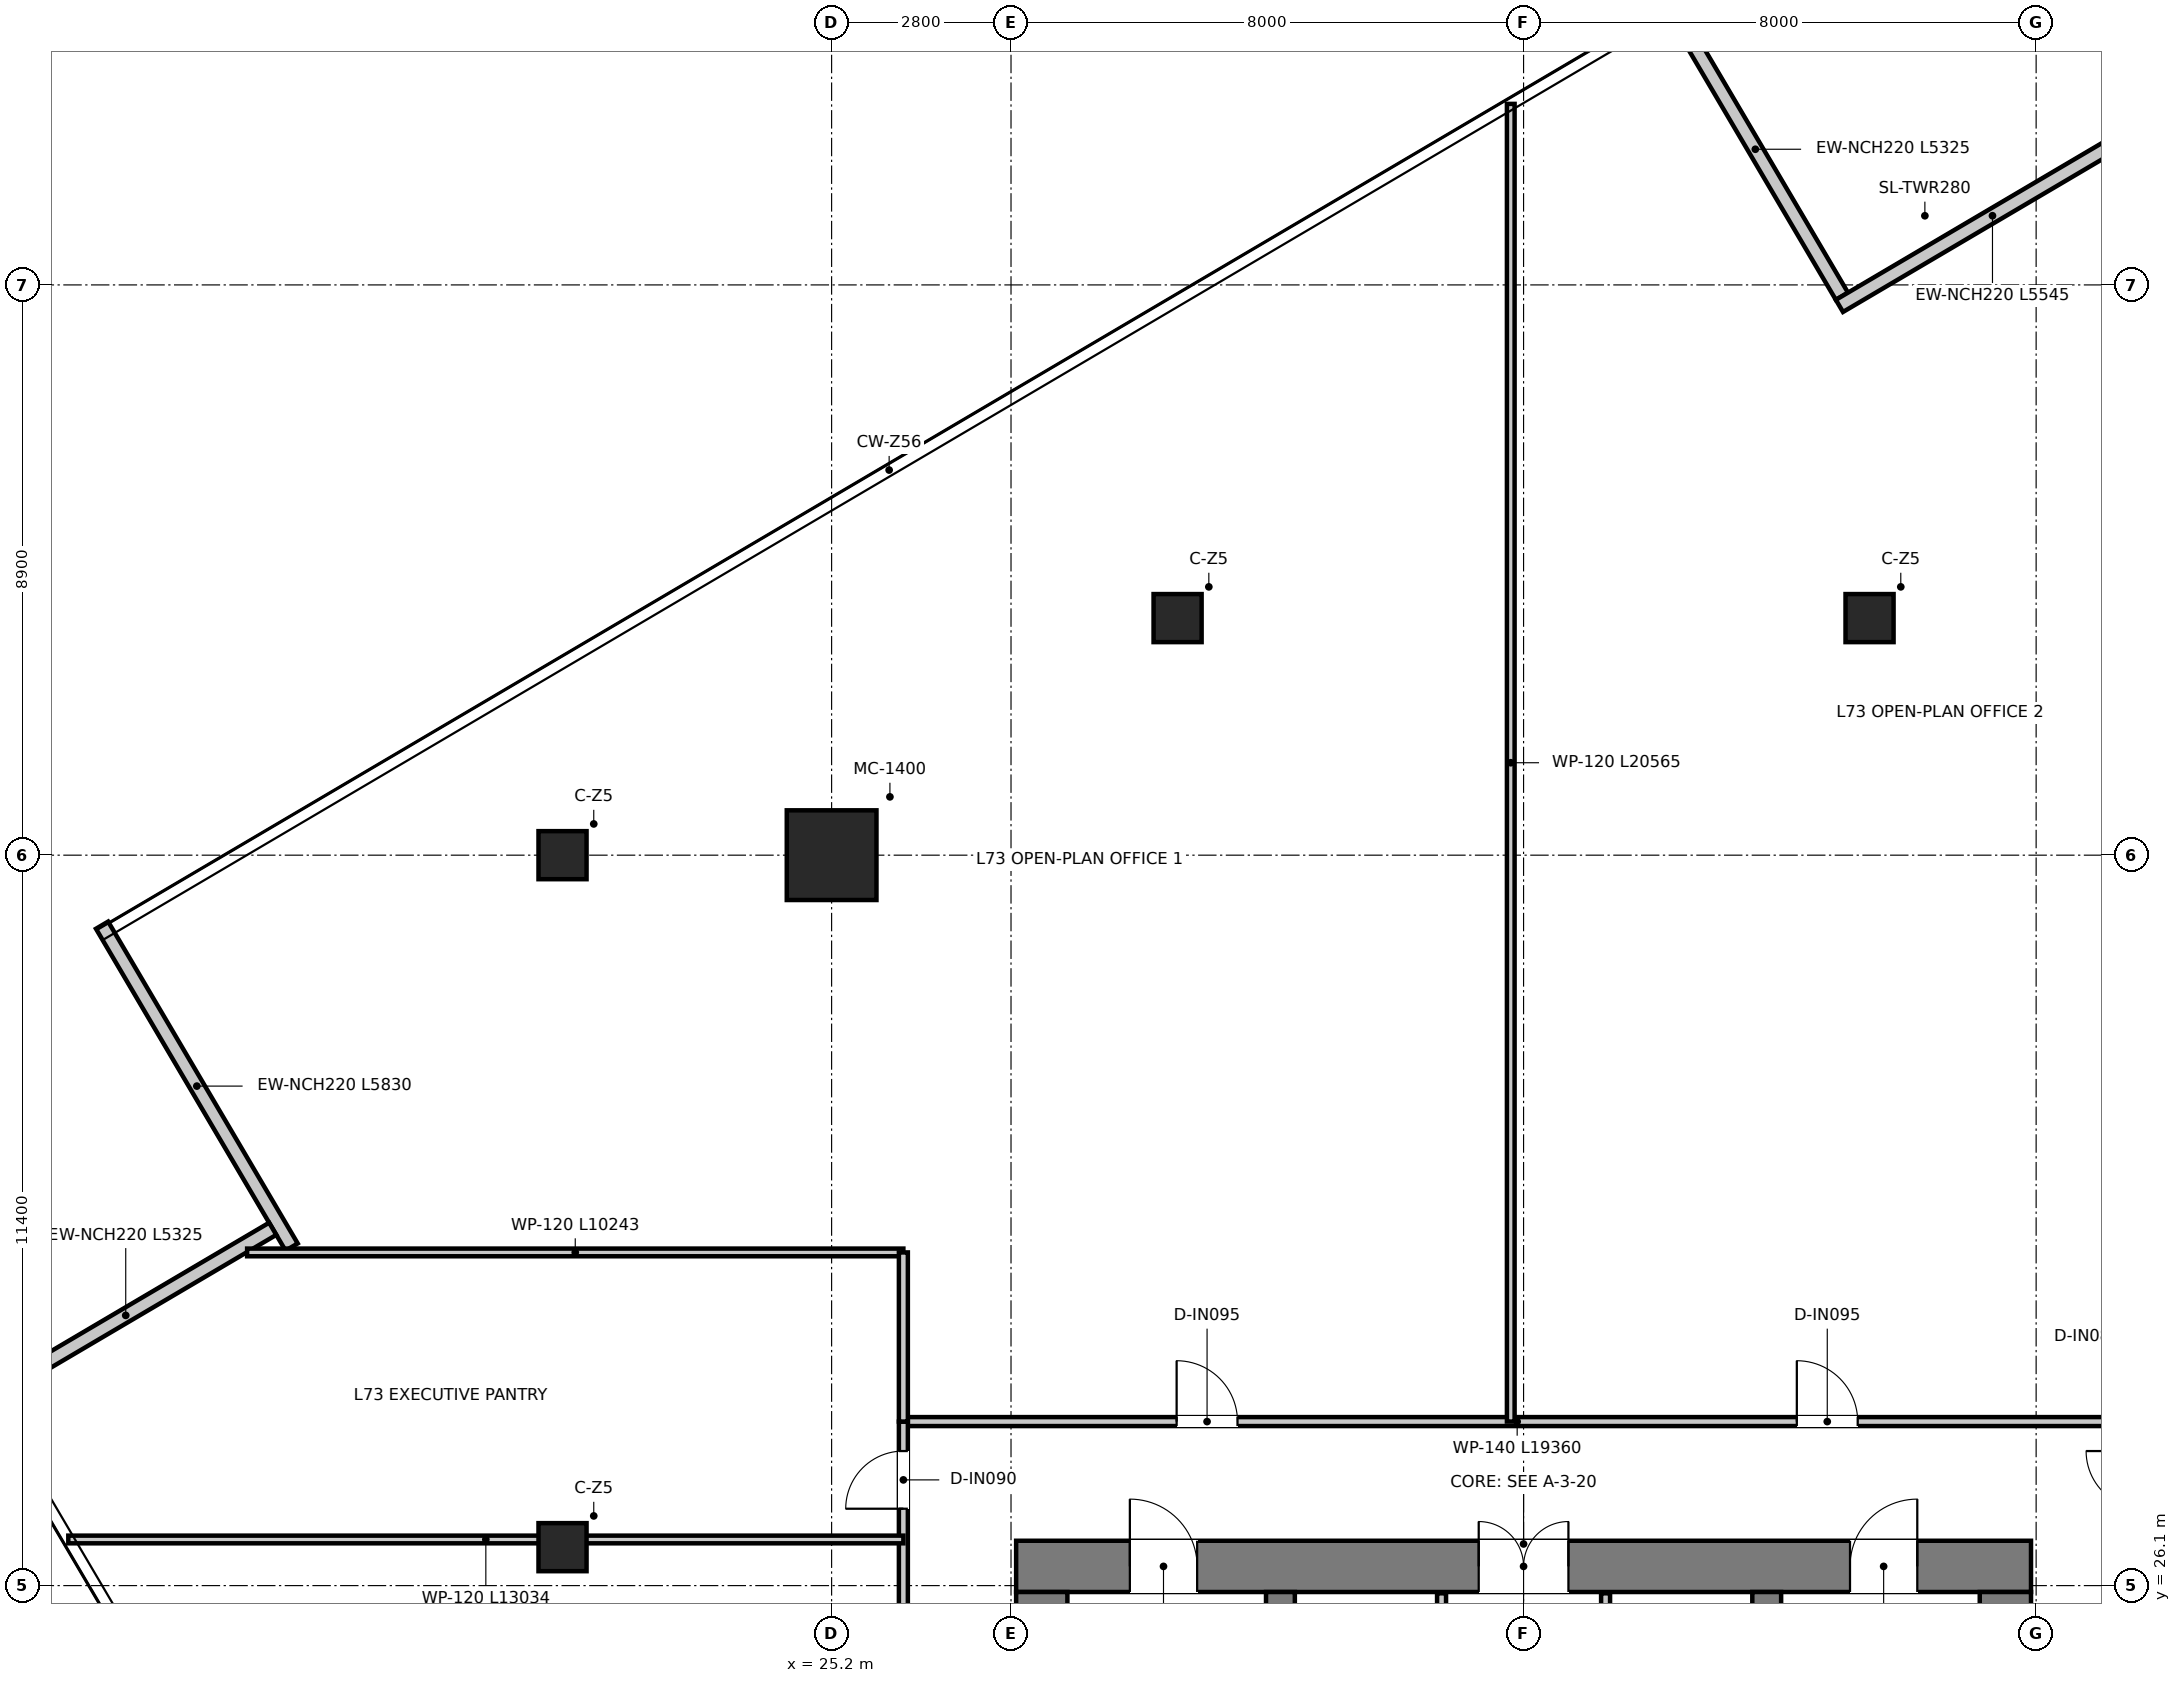
"""IFC4 building model, lengths in metres.
Left out: names, types, materials, properties, quantities, classifications, styles, units other than length and angle.
Written with IfcOpenShell. Run it as: python <this file> out.ifc"""

import sys

from ifc_helpers import new_model, si_unit, direction, frame, frame_2d, origin, origin_2d, place, context, subcontext, project, spatial, rectangle, extrude, source, transform, mapped, element, fill, save


model = new_model("IFC4")
c1 = context("Model", 3, precision=1e-05, world=origin(), true_north=direction((0.0, 1.0)))
c2 = subcontext(c1, "Body", "Model", "MODEL_VIEW")
j1 = project(units=[si_unit("LENGTHUNIT", "METRE"), si_unit("PLANEANGLEUNIT", "RADIAN")], contexts=[c1])
p1 = place(None, origin())
s1 = spatial("IfcSite", under=j1, at=p1, CompositionType="ELEMENT")
p2 = place(p1, origin())
s2 = spatial("IfcBuilding", under=s1, at=p2, CompositionType="ELEMENT")
p3 = place(p2, frame((0.0, 0.0, 299.0)))
s3 = spatial("IfcBuildingStorey", under=s2, at=p3, CompositionType="ELEMENT", Elevation=299.0)
p4 = place(p3, frame((28.08, 26.4, 0.0), z_axis=(0.0, 0.0, 1.0), x_axis=(1.0, 0.0, 0.0)))
e1 = element("IfcWall", 1, at=p4, inside=s3, PredefinedType="SHEAR", context=c2, shape_type="SweptSolid", body=[
    extrude(rectangle(XDim=15.84, YDim=0.8, at=frame_2d((7.92, 0.0))), origin(), (0.0, 0.0, 1.0), 3.95),
])
p5 = place(p4, frame((7.22, 0.0, 0.0)))
e2 = element("IfcOpeningElement", 2, at=p5, cuts=e1, PredefinedType="OPENING", context=c2, shape_type="SweptSolid", body=[
    extrude(rectangle(XDim=1.4, YDim=2.2, at=frame_2d((0.7, 1.1))), frame((0.0, 0.41, 0.0), z_axis=(0.0, -1.0, 0.0), x_axis=(1.0, 0.0, 0.0)), (0.0, 0.0, 1.0), 0.82),
])
p6 = place(p4, frame((1.775, 0.0, 0.0)))
e3 = element("IfcOpeningElement", 3, at=p6, cuts=e1, PredefinedType="OPENING", context=c2, shape_type="SweptSolid", body=[
    extrude(rectangle(XDim=1.05, YDim=2.1, at=frame_2d((0.525, 1.05))), frame((0.0, 0.41, 0.0), z_axis=(0.0, -1.0, 0.0), x_axis=(1.0, 0.0, 0.0)), (0.0, 0.0, 1.0), 0.82),
])
p7 = place(p4, frame((13.015, 0.0, 0.0)))
e4 = element("IfcOpeningElement", 4, at=p7, cuts=e1, PredefinedType="OPENING", context=c2, shape_type="SweptSolid", body=[
    extrude(rectangle(XDim=1.05, YDim=2.1, at=frame_2d((0.525, 1.05))), frame((0.0, 0.41, 0.0), z_axis=(0.0, -1.0, 0.0), x_axis=(1.0, 0.0, 0.0)), (0.0, 0.0, 1.0), 0.82),
])
for number, where, z_axis, x_axis in (
    (5, (28.48, 11.3, 0.0), (0.0, 0.0, 1.0), (0.0, 1.0, 0.0)),
    (6, (43.52, 11.3, 0.0), (0.0, 0.0, 1.0), (0.0, 1.0, 0.0)),
):
    element("IfcWall", number, at=place(p3, frame(where, z_axis=z_axis, x_axis=x_axis)), inside=s3, PredefinedType="SHEAR", context=c2, shape_type="SweptSolid", body=[
        extrude(rectangle(XDim=14.7, YDim=0.8, at=frame_2d((7.35, 0.0))), origin(), (0.0, 0.0, 1.0), 3.95),
    ])
p8 = place(p3, frame((32.205, 13.22, 0.0), z_axis=(0.0, 0.0, 1.0), x_axis=(0.0, 1.0, 0.0)))
e7 = element("IfcWall", 7, at=p8, inside=s3, PredefinedType="SHEAR", context=c2, shape_type="SweptSolid", body=[
    extrude(rectangle(XDim=12.78, YDim=0.45, at=frame_2d((6.39, 0.0))), origin(), (0.0, 0.0, 1.0), 3.95),
])
p9 = place(p8, frame((10.58, 0.0, 0.0)))
e8 = element("IfcOpeningElement", 8, at=p9, cuts=e7, PredefinedType="OPENING", context=c2, shape_type="SweptSolid", body=[
    extrude(rectangle(XDim=1.1, YDim=2.15, at=frame_2d((0.55, 1.075))), frame((0.0, 0.235, 0.0), z_axis=(0.0, -1.0, 0.0), x_axis=(1.0, 0.0, 0.0)), (0.0, 0.0, 1.0), 0.47),
])
p10 = place(p3, frame((39.795, 13.22, 0.0), z_axis=(0.0, 0.0, 1.0), x_axis=(0.0, 1.0, 0.0)))
e9 = element("IfcWall", 9, at=p10, inside=s3, PredefinedType="SHEAR", context=c2, shape_type="SweptSolid", body=[
    extrude(rectangle(XDim=12.78, YDim=0.45, at=frame_2d((6.39, 0.0))), origin(), (0.0, 0.0, 1.0), 3.95),
])
p11 = place(p10, frame((10.58, 0.0, 0.0)))
e10 = element("IfcOpeningElement", 10, at=p11, cuts=e9, PredefinedType="OPENING", context=c2, shape_type="SweptSolid", body=[
    extrude(rectangle(XDim=1.1, YDim=2.15, at=frame_2d((0.55, 1.075))), frame((0.0, 0.235, 0.0), z_axis=(0.0, -1.0, 0.0), x_axis=(1.0, 0.0, 0.0)), (0.0, 0.0, 1.0), 0.47),
])
m1 = source(origin(), c2, "Body", "SweptSolid", [
    extrude(rectangle(XDim=1.4, YDim=1.4, at=origin_2d()), origin(), (0.0, 0.0, 1.0), 3.95),
])
p12 = place(p3, frame((25.2, 37.5, 0.0), z_axis=(0.0, 0.0, 1.0), x_axis=(1.0, 0.0, 0.0)))
e11 = element("IfcColumn", 11, at=p12, inside=s3, PredefinedType="USERDEFINED", context=c2, shape_type="MappedRepresentation", body=[
    mapped(m1, transform((0.0, 0.0, 0.0), x_axis=(1.0, 0.0, 0.0), y_axis=(0.0, 1.0, 0.0), z_axis=(0.0, 0.0, 1.0), scale=1.0)),
])
m2 = source(origin(), c2, "Body", "SweptSolid", [
    extrude(rectangle(XDim=0.75, YDim=0.75, at=origin_2d()), origin(), (0.0, 0.0, 1.0), 3.95),
])
for number, where, z_axis, x_axis in (
    (12, (21.0, 26.7, 0.0), (0.0, 0.0, 1.0), (1.0, 0.0, 0.0)),
    (13, (21.0, 37.5, 0.0), (0.0, 0.0, 1.0), (1.0, 0.0, 0.0)),
    (14, (30.6, 41.2, 0.0), (0.0, 0.0, 1.0), (1.0, 0.0, 0.0)),
    (15, (41.4, 41.2, 0.0), (0.0, 0.0, 1.0), (1.0, 0.0, 0.0)),
):
    element("IfcColumn", number, at=place(p3, frame(where, z_axis=z_axis, x_axis=x_axis)), inside=s3, PredefinedType="COLUMN", context=c2, shape_type="MappedRepresentation", body=[
        mapped(m2, transform((0.0, 0.0, 0.0), x_axis=(1.0, 0.0, 0.0), y_axis=(0.0, 1.0, 0.0), z_axis=(0.0, 0.0, 1.0), scale=1.0)),
    ])
p13 = place(p3, frame((40.969, 46.223, 0.0), z_axis=(0.0, 0.0, 1.0), x_axis=(-0.507540984104, 0.861627616465, 0.0)))
e16 = element("IfcWall", 16, at=p13, inside=s3, PredefinedType="ELEMENTEDWALL", context=c2, shape_type="SweptSolid", body=[
    extrude(rectangle(XDim=5.325, YDim=0.22, at=frame_2d((2.663, 0.0))), origin(), (0.0, 0.0, 1.0), 3.67),
])
p14 = place(p3, frame((13.813, 36.407, 0.0), z_axis=(0.0, 0.0, 1.0), x_axis=(0.507550761113, -0.861621857252, 0.0)))
e17 = element("IfcWall", 17, at=p14, inside=s3, PredefinedType="ELEMENTEDWALL", context=c2, shape_type="SweptSolid", body=[
    extrude(rectangle(XDim=5.83, YDim=0.22, at=frame_2d((2.915, 0.0))), origin(), (0.0, 0.0, 1.0), 3.67),
])
p15 = place(p3, frame((16.477, 31.669, 0.0), z_axis=(0.0, 0.0, 1.0), x_axis=(-0.861627616465, -0.507540984104, 0.0)))
e18 = element("IfcWall", 18, at=p15, inside=s3, PredefinedType="ELEMENTEDWALL", context=c2, shape_type="SweptSolid", body=[
    extrude(rectangle(XDim=5.325, YDim=0.22, at=frame_2d((2.663, 0.0))), origin(), (0.0, 0.0, 1.0), 3.67),
])
p16 = place(p3, frame((45.708, 48.887, 0.0), z_axis=(0.0, 0.0, 1.0), x_axis=(-0.861640923955, -0.507518391948, 0.0)))
e19 = element("IfcWall", 19, at=p16, inside=s3, PredefinedType="ELEMENTEDWALL", context=c2, shape_type="SweptSolid", body=[
    extrude(rectangle(XDim=5.545, YDim=0.22, at=frame_2d((2.772, 0.0))), origin(), (0.0, 0.0, 1.0), 3.67),
])
p17 = place(p3, frame((34.72, 20.2, 0.0), z_axis=(0.0, 0.0, 1.0), x_axis=(0.0, 1.0, 0.0)))
e20 = element("IfcWall", 20, at=p17, inside=s3, PredefinedType="PARTITIONING", context=c2, shape_type="SweptSolid", body=[
    extrude(rectangle(XDim=5.78, YDim=0.14, at=frame_2d((2.89, 0.0))), origin(), (0.0, 0.0, 1.0), 2.82),
])
p18 = place(p17, frame((1.05, 0.0, 0.0)))
e21 = element("IfcOpeningElement", 21, at=p18, cuts=e20, PredefinedType="OPENING", context=c2, shape_type="SweptSolid", body=[
    extrude(rectangle(XDim=0.9, YDim=2.1, at=frame_2d((0.45, 1.05))), frame((0.0, 0.08, 0.0), z_axis=(0.0, -1.0, 0.0), x_axis=(1.0, 0.0, 0.0)), (0.0, 0.0, 1.0), 0.16),
])
p19 = place(p3, frame((37.28, 20.2, 0.0), z_axis=(0.0, 0.0, 1.0), x_axis=(0.0, 1.0, 0.0)))
e22 = element("IfcWall", 22, at=p19, inside=s3, PredefinedType="PARTITIONING", context=c2, shape_type="SweptSolid", body=[
    extrude(rectangle(XDim=5.78, YDim=0.14, at=frame_2d((2.89, 0.0))), origin(), (0.0, 0.0, 1.0), 2.82),
])
p20 = place(p19, frame((0.95, 0.0, 0.0)))
e23 = element("IfcOpeningElement", 23, at=p20, cuts=e22, PredefinedType="OPENING", context=c2, shape_type="SweptSolid", body=[
    extrude(rectangle(XDim=1.1, YDim=2.15, at=frame_2d((0.55, 1.075))), frame((0.0, 0.08, 0.0), z_axis=(0.0, -1.0, 0.0), x_axis=(1.0, 0.0, 0.0)), (0.0, 0.0, 1.0), 0.16),
])
p21 = place(p3, frame((26.32, 28.66, 0.0), z_axis=(0.0, 0.0, 1.0), x_axis=(1.0, 0.0, 0.0)))
e24 = element("IfcWall", 24, at=p21, inside=s3, PredefinedType="PARTITIONING", context=c2, shape_type="SweptSolid", body=[
    extrude(rectangle(XDim=19.36, YDim=0.14, at=frame_2d((9.68, 0.0))), origin(), (0.0, 0.0, 1.0), 3.18),
])
p22 = place(p21, frame((4.265, 0.0, 0.0)))
e25 = element("IfcOpeningElement", 25, at=p22, cuts=e24, PredefinedType="OPENING", context=c2, shape_type="SweptSolid", body=[
    extrude(rectangle(XDim=0.95, YDim=2.1, at=frame_2d((0.475, 1.05))), frame((0.0, 0.08, 0.0), z_axis=(0.0, -1.0, 0.0), x_axis=(1.0, 0.0, 0.0)), (0.0, 0.0, 1.0), 0.16),
])
p23 = place(p21, frame((13.945, 0.0, 0.0)))
e26 = element("IfcOpeningElement", 26, at=p23, cuts=e24, PredefinedType="OPENING", context=c2, shape_type="SweptSolid", body=[
    extrude(rectangle(XDim=0.95, YDim=2.1, at=frame_2d((0.475, 1.05))), frame((0.0, 0.08, 0.0), z_axis=(0.0, -1.0, 0.0), x_axis=(1.0, 0.0, 0.0)), (0.0, 0.0, 1.0), 0.16),
])
p24 = place(p3, frame((26.32, 9.0, 0.0), z_axis=(0.0, 0.0, 1.0), x_axis=(0.0, 1.0, 0.0)))
e27 = element("IfcWall", 27, at=p24, inside=s3, PredefinedType="PARTITIONING", context=c2, shape_type="SweptSolid", body=[
    extrude(rectangle(XDim=19.66, YDim=0.14, at=frame_2d((9.83, 0.0))), origin(), (0.0, 0.0, 1.0), 3.13),
])
p25 = place(p24, frame((18.3, 0.0, 0.0)))
e28 = element("IfcOpeningElement", 28, at=p25, cuts=e27, PredefinedType="OPENING", context=c2, shape_type="SweptSolid", body=[
    extrude(rectangle(XDim=0.9, YDim=2.1, at=frame_2d((0.45, 1.05))), frame((0.0, 0.08, 0.0), z_axis=(0.0, -1.0, 0.0), x_axis=(1.0, 0.0, 0.0)), (0.0, 0.0, 1.0), 0.16),
])
p26 = place(p24, frame((1.65, 0.0, 0.0)))
e29 = element("IfcOpeningElement", 29, at=p26, cuts=e27, PredefinedType="OPENING", context=c2, shape_type="SweptSolid", body=[
    extrude(rectangle(XDim=0.9, YDim=2.1, at=frame_2d((0.45, 1.05))), frame((0.0, 0.08, 0.0), z_axis=(0.0, -1.0, 0.0), x_axis=(1.0, 0.0, 0.0)), (0.0, 0.0, 1.0), 0.16),
])
p27 = place(p24, frame((8.7, 0.0, 0.0)))
e30 = element("IfcOpeningElement", 30, at=p27, cuts=e27, PredefinedType="OPENING", context=c2, shape_type="SweptSolid", body=[
    extrude(rectangle(XDim=0.9, YDim=2.1, at=frame_2d((0.45, 1.05))), frame((0.0, 0.08, 0.0), z_axis=(0.0, -1.0, 0.0), x_axis=(1.0, 0.0, 0.0)), (0.0, 0.0, 1.0), 0.16),
])
p28 = place(p24, frame((11.85, 0.0, 0.0)))
e31 = element("IfcOpeningElement", 31, at=p28, cuts=e27, PredefinedType="OPENING", context=c2, shape_type="SweptSolid", body=[
    extrude(rectangle(XDim=0.9, YDim=2.1, at=frame_2d((0.45, 1.05))), frame((0.0, 0.08, 0.0), z_axis=(0.0, -1.0, 0.0), x_axis=(1.0, 0.0, 0.0)), (0.0, 0.0, 1.0), 0.16),
])
p29 = place(p24, frame((15.86, 0.0, 0.0)))
e32 = element("IfcOpeningElement", 32, at=p29, cuts=e27, PredefinedType="OPENING", context=c2, shape_type="SweptSolid", body=[
    extrude(rectangle(XDim=0.9, YDim=2.1, at=frame_2d((0.45, 1.05))), frame((0.0, 0.08, 0.0), z_axis=(0.0, -1.0, 0.0), x_axis=(1.0, 0.0, 0.0)), (0.0, 0.0, 1.0), 0.16),
])
p30 = place(p3, frame((13.286, 26.82, 0.0), z_axis=(0.0, 0.0, 1.0), x_axis=(1.0, 0.0, 0.0)))
e33 = element("IfcWall", 33, at=p30, inside=s3, PredefinedType="PARTITIONING", context=c2, shape_type="SweptSolid", body=[
    extrude(rectangle(XDim=13.034, YDim=0.12, at=frame_2d((6.517, 0.0))), origin(), (0.0, 0.0, 1.0), 3.13),
])
p31 = place(p3, frame((16.077, 31.3, 0.0), z_axis=(0.0, 0.0, 1.0), x_axis=(1.0, 0.0, 0.0)))
e34 = element("IfcWall", 34, at=p31, inside=s3, PredefinedType="PARTITIONING", context=c2, shape_type="SweptSolid", body=[
    extrude(rectangle(XDim=10.243, YDim=0.12, at=frame_2d((5.121, 0.0))), origin(), (0.0, 0.0, 1.0), 3.13),
])
p32 = place(p3, frame((26.32, 28.66, 0.0), z_axis=(0.0, 0.0, 1.0), x_axis=(0.0, 1.0, 0.0)))
e35 = element("IfcWall", 35, at=p32, inside=s3, PredefinedType="PARTITIONING", context=c2, shape_type="SweptSolid", body=[
    extrude(rectangle(XDim=2.64, YDim=0.14, at=frame_2d((1.32, 0.0))), origin(), (0.0, 0.0, 1.0), 3.43),
])
p33 = place(p3, frame((35.8, 28.66, 0.0), z_axis=(0.0, 0.0, 1.0), x_axis=(0.0, 1.0, 0.0)))
e36 = element("IfcWall", 36, at=p33, inside=s3, PredefinedType="PARTITIONING", context=c2, shape_type="SweptSolid", body=[
    extrude(rectangle(XDim=20.565, YDim=0.12, at=frame_2d((10.283, 0.0))), origin(), (0.0, 0.0, 1.0), 3.13),
])
p34 = place(p5, origin())
e37 = element("IfcDoor", 37, at=p34, inside=s3, OperationType="DOUBLE_DOOR_SINGLE_SWING", PredefinedType="DOOR", context=c2, shape_type="SweptSolid", body=[
    extrude(rectangle(XDim=1.4, YDim=2.2, at=frame_2d((0.7, 1.1))), frame((0.0, 0.025, 0.0), z_axis=(0.0, -1.0, 0.0), x_axis=(1.0, 0.0, 0.0)), (0.0, 0.0, 1.0), 0.05),
])
fill(e2, e37)
p35 = place(p6, origin())
e38 = element("IfcDoor", 38, at=p35, inside=s3, OperationType="SINGLE_SWING_LEFT", PredefinedType="DOOR", context=c2, shape_type="SweptSolid", body=[
    extrude(rectangle(XDim=1.05, YDim=2.1, at=frame_2d((0.525, 1.05))), frame((0.0, 0.025, 0.0), z_axis=(0.0, -1.0, 0.0), x_axis=(1.0, 0.0, 0.0)), (0.0, 0.0, 1.0), 0.05),
])
fill(e3, e38)
p36 = place(p7, origin())
e39 = element("IfcDoor", 39, at=p36, inside=s3, OperationType="SINGLE_SWING_RIGHT", PredefinedType="DOOR", context=c2, shape_type="SweptSolid", body=[
    extrude(rectangle(XDim=1.05, YDim=2.1, at=frame_2d((0.525, 1.05))), frame((0.0, 0.025, 0.0), z_axis=(0.0, -1.0, 0.0), x_axis=(1.0, 0.0, 0.0)), (0.0, 0.0, 1.0), 0.05),
])
fill(e4, e39)
p37 = place(p25, origin())
e40 = element("IfcDoor", 40, at=p37, inside=s3, OperationType="SINGLE_SWING_LEFT", PredefinedType="DOOR", context=c2, shape_type="SweptSolid", body=[
    extrude(rectangle(XDim=0.9, YDim=2.1, at=frame_2d((0.45, 1.05))), frame((0.0, 0.025, 0.0), z_axis=(0.0, -1.0, 0.0), x_axis=(1.0, 0.0, 0.0)), (0.0, 0.0, 1.0), 0.05),
])
fill(e28, e40)
p38 = place(p22, origin())
e41 = element("IfcDoor", 41, at=p38, inside=s3, OperationType="SINGLE_SWING_LEFT", PredefinedType="DOOR", context=c2, shape_type="SweptSolid", body=[
    extrude(rectangle(XDim=0.95, YDim=2.1, at=frame_2d((0.475, 1.05))), frame((0.0, 0.025, 0.0), z_axis=(0.0, -1.0, 0.0), x_axis=(1.0, 0.0, 0.0)), (0.0, 0.0, 1.0), 0.05),
])
fill(e25, e41)
p39 = place(p23, origin())
e42 = element("IfcDoor", 42, at=p39, inside=s3, OperationType="SINGLE_SWING_LEFT", PredefinedType="DOOR", context=c2, shape_type="SweptSolid", body=[
    extrude(rectangle(XDim=0.95, YDim=2.1, at=frame_2d((0.475, 1.05))), frame((0.0, 0.025, 0.0), z_axis=(0.0, -1.0, 0.0), x_axis=(1.0, 0.0, 0.0)), (0.0, 0.0, 1.0), 0.05),
])
fill(e26, e42)
save(model, sys.argv[1])
